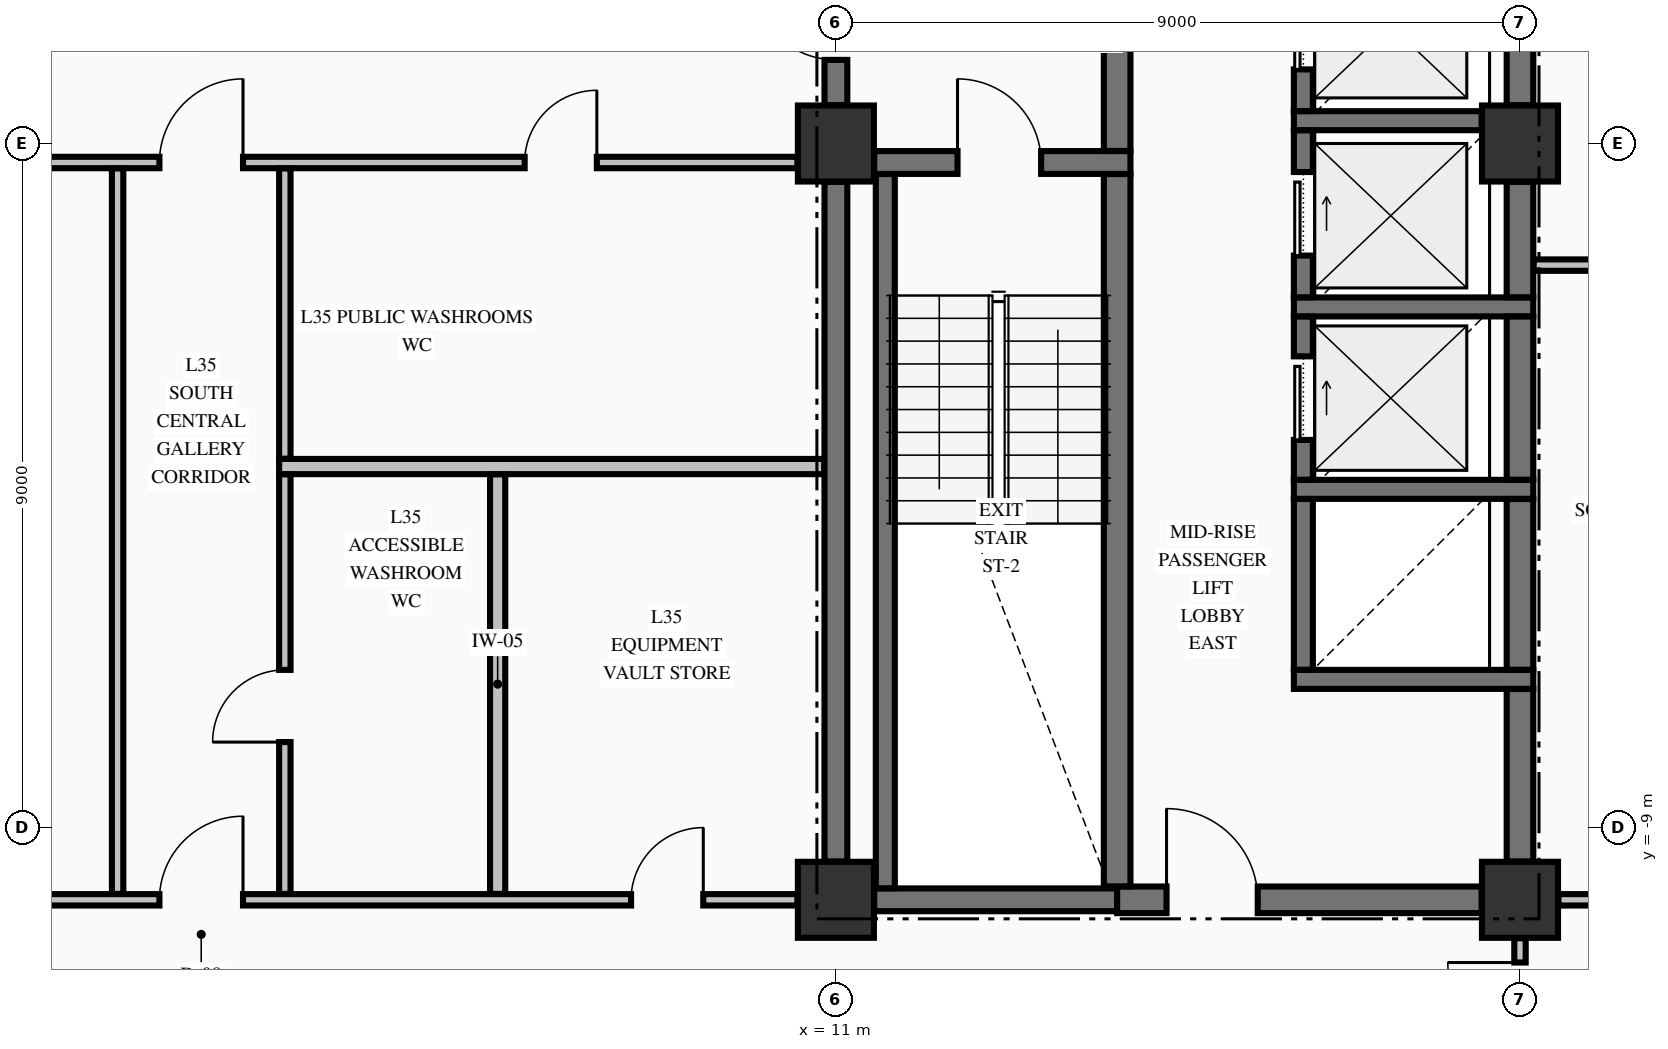
"""IFC4 building model, lengths in metres.
Left out: names, types, materials, properties, quantities, classifications, styles, units other than length and angle.
Written with IfcOpenShell. Run it as: python <this file> out.ifc"""

import sys

from ifc_helpers import new_model, si_unit, direction, frame, frame_2d, origin, origin_2d, place, context, subcontext, project, spatial, rectangle, extrude, element, fill, save


model = new_model("IFC4")
c1 = context("Model", 3, precision=1e-05, world=origin(), true_north=direction((0.0, 1.0)))
c2 = subcontext(c1, "Body", "Model", "MODEL_VIEW")
j1 = project(units=[si_unit("LENGTHUNIT", "METRE"), si_unit("PLANEANGLEUNIT", "RADIAN")], contexts=[c1])
p1 = place(None, origin())
s1 = spatial("IfcSite", under=j1, at=p1, CompositionType="ELEMENT")
p2 = place(p1, origin())
s2 = spatial("IfcBuilding", under=s1, at=p2, CompositionType="ELEMENT")
p3 = place(p2, frame((0.0, 0.0, 139.2)))
s3 = spatial("IfcBuildingStorey", under=s2, at=p3, CompositionType="ELEMENT", Elevation=139.2)
for number, where, z_axis, x_axis in (
    (1, (11.0, -9.95, -0.25), (0.0, 0.0, 1.0), (1.0, 0.0, 0.0)),
    (2, (11.0, 0.0, -0.25), (0.0, 0.0, 1.0), (1.0, 0.0, 0.0)),
    (3, (20.0, -9.95, -0.25), (0.0, 0.0, 1.0), (1.0, 0.0, 0.0)),
    (4, (20.0, 0.0, -0.25), (0.0, 0.0, 1.0), (1.0, 0.0, 0.0)),
):
    element("IfcColumn", number, at=place(p3, frame(where, z_axis=z_axis, x_axis=x_axis)), inside=s3, PredefinedType="COLUMN", context=c2, shape_type="SweptSolid", body=[
        extrude(rectangle(XDim=1.0, YDim=1.0, at=origin_2d()), origin(), (0.0, 0.0, 1.0), 3.495),
    ])
p4 = place(p3, frame((11.504, -9.95, 0.0), z_axis=(0.0, 0.0, 1.0), x_axis=(1.0, 0.0, 0.0)))
e5 = element("IfcWall", 5, at=p4, inside=s3, PredefinedType="SHEAR", context=c2, shape_type="SweptSolid", body=[
    extrude(rectangle(XDim=3.196, YDim=0.3, at=frame_2d((1.598, 0.0))), origin(), (0.0, 0.0, 1.0), 3.245),
])
p5 = place(p3, frame((14.7, -9.95, 0.0), z_axis=(0.0, 0.0, 1.0), x_axis=(1.0, 0.0, 0.0)))
e6 = element("IfcWall", 6, at=p5, inside=s3, PredefinedType="SHEAR", context=c2, shape_type="SweptSolid", body=[
    extrude(rectangle(XDim=4.796, YDim=0.35, at=frame_2d((2.398, 0.0))), origin(), (0.0, 0.0, 1.0), 3.245),
])
p6 = place(p5, frame((0.65, 0.0, 0.0)))
e7 = element("IfcOpeningElement", 7, at=p6, cuts=e6, PredefinedType="OPENING", context=c2, shape_type="SweptSolid", body=[
    extrude(rectangle(XDim=1.2, YDim=2.15, at=frame_2d((0.6, 1.075))), frame((0.0, 0.185, 0.0), z_axis=(0.0, -1.0, 0.0), x_axis=(1.0, 0.0, 0.0)), (0.0, 0.0, 1.0), 0.37),
])
for number, where, z_axis, x_axis in (
    (8, (17.025, -7.05, 0.0), (0.0, 0.0, 1.0), (1.0, 0.0, 0.0)),
    (9, (17.025, -4.55, 0.0), (0.0, 0.0, 1.0), (1.0, 0.0, 0.0)),
    (10, (17.025, -2.15, 0.0), (0.0, 0.0, 1.0), (1.0, 0.0, 0.0)),
):
    element("IfcWall", number, at=place(p3, frame(where, z_axis=z_axis, x_axis=x_axis)), inside=s3, PredefinedType="SOLIDWALL", context=c2, shape_type="SweptSolid", body=[
        extrude(rectangle(XDim=3.15, YDim=0.25, at=frame_2d((1.575, 0.0))), origin(), (0.0, 0.0, 1.0), 3.245),
    ])
p7 = place(p3, frame((11.504, -0.25, 0.0), z_axis=(0.0, 0.0, 1.0), x_axis=(1.0, 0.0, 0.0)))
e11 = element("IfcWall", 11, at=p7, inside=s3, PredefinedType="SHEAR", context=c2, shape_type="SweptSolid", body=[
    extrude(rectangle(XDim=3.371, YDim=0.3, at=frame_2d((1.686, 0.0))), origin(), (0.0, 0.0, 1.0), 3.245),
])
p8 = place(p7, frame((1.096, 0.0, 0.0)))
e12 = element("IfcOpeningElement", 12, at=p8, cuts=e11, PredefinedType="OPENING", context=c2, shape_type="SweptSolid", body=[
    extrude(rectangle(XDim=1.1, YDim=2.15, at=frame_2d((0.55, 1.075))), frame((0.0, 0.16, 0.0), z_axis=(0.0, -1.0, 0.0), x_axis=(1.0, 0.0, 0.0)), (0.0, 0.0, 1.0), 0.32),
])
p9 = place(p3, frame((17.025, 0.3, 0.0), z_axis=(0.0, 0.0, 1.0), x_axis=(1.0, 0.0, 0.0)))
e13 = element("IfcWall", 13, at=p9, inside=s3, PredefinedType="SOLIDWALL", context=c2, shape_type="SweptSolid", body=[
    extrude(rectangle(XDim=2.471, YDim=0.25, at=frame_2d((1.236, 0.0))), origin(), (0.0, 0.0, 1.0), 3.245),
])
p10 = place(p3, frame((-10.494, -9.95, 0.0), z_axis=(0.0, 0.0, 1.0), x_axis=(1.0, 0.0, 0.0)))
e14 = element("IfcWall", 14, at=p10, inside=s3, PredefinedType="PARTITIONING", context=c2, shape_type="SweptSolid", body=[
    extrude(rectangle(XDim=20.988, YDim=0.15, at=frame_2d((10.494, 0.0))), origin(), (0.0, 0.0, 1.0), 3.245),
])
p11 = place(p10, frame((12.594, 0.0, 0.0)))
e15 = element("IfcOpeningElement", 15, at=p11, cuts=e14, PredefinedType="OPENING", context=c2, shape_type="SweptSolid", body=[
    extrude(rectangle(XDim=1.1, YDim=2.15, at=frame_2d((0.55, 1.075))), frame((0.0, 0.085, 0.0), z_axis=(0.0, -1.0, 0.0), x_axis=(1.0, 0.0, 0.0)), (0.0, 0.0, 1.0), 0.17),
])
p12 = place(p10, frame((18.799, 0.0, 0.0)))
e16 = element("IfcOpeningElement", 16, at=p12, cuts=e14, PredefinedType="OPENING", context=c2, shape_type="SweptSolid", body=[
    extrude(rectangle(XDim=0.95, YDim=2.15, at=frame_2d((0.475, 1.075))), frame((0.0, 0.085, 0.0), z_axis=(0.0, -1.0, 0.0), x_axis=(1.0, 0.0, 0.0)), (0.0, 0.0, 1.0), 0.17),
])
p13 = place(p3, frame((20.506, -9.95, 0.0), z_axis=(0.0, 0.0, 1.0), x_axis=(1.0, 0.0, 0.0)))
e17 = element("IfcWall", 17, at=p13, inside=s3, PredefinedType="PARTITIONING", context=c2, shape_type="SweptSolid", body=[
    extrude(rectangle(XDim=2.329, YDim=0.15, at=frame_2d((1.165, 0.0))), origin(), (0.0, 0.0, 1.0), 3.245),
])
p14 = place(p13, frame((0.519, 0.0, 0.0)))
e18 = element("IfcOpeningElement", 18, at=p14, cuts=e17, PredefinedType="OPENING", context=c2, shape_type="SweptSolid", body=[
    extrude(rectangle(XDim=0.95, YDim=2.15, at=frame_2d((0.475, 1.075))), frame((0.0, 0.085, 0.0), z_axis=(0.0, -1.0, 0.0), x_axis=(1.0, 0.0, 0.0)), (0.0, 0.0, 1.0), 0.17),
])
p15 = place(p3, frame((3.675, -4.25, 0.0), z_axis=(0.0, 0.0, 1.0), x_axis=(1.0, 0.0, 0.0)))
e19 = element("IfcWall", 19, at=p15, inside=s3, PredefinedType="PARTITIONING", context=c2, shape_type="SweptSolid", body=[
    extrude(rectangle(XDim=7.172, YDim=0.2, at=frame_2d((3.586, 0.0))), origin(), (0.0, 0.0, 1.0), 3.245),
])
p16 = place(p3, frame((20.178, -1.6, 0.0), z_axis=(0.0, 0.0, 1.0), x_axis=(1.0, 0.0, 0.0)))
e20 = element("IfcWall", 20, at=p16, inside=s3, PredefinedType="PARTITIONING", context=c2, shape_type="SweptSolid", body=[
    extrude(rectangle(XDim=2.657, YDim=0.15, at=frame_2d((1.329, 0.0))), origin(), (0.0, 0.0, 1.0), 3.245),
])
p17 = place(p3, frame((-10.494, -0.25, 0.0), z_axis=(0.0, 0.0, 1.0), x_axis=(1.0, 0.0, 0.0)))
e21 = element("IfcWall", 21, at=p17, inside=s3, PredefinedType="PARTITIONING", context=c2, shape_type="SweptSolid", body=[
    extrude(rectangle(XDim=20.988, YDim=0.15, at=frame_2d((10.494, 0.0))), origin(), (0.0, 0.0, 1.0), 3.245),
])
p18 = place(p17, frame((12.594, 0.0, 0.0)))
e22 = element("IfcOpeningElement", 22, at=p18, cuts=e21, PredefinedType="OPENING", context=c2, shape_type="SweptSolid", body=[
    extrude(rectangle(XDim=1.1, YDim=2.15, at=frame_2d((0.55, 1.075))), frame((0.0, 0.085, 0.0), z_axis=(0.0, -1.0, 0.0), x_axis=(1.0, 0.0, 0.0)), (0.0, 0.0, 1.0), 0.17),
])
p19 = place(p17, frame((5.249, 0.0, 0.0)))
e23 = element("IfcOpeningElement", 23, at=p19, cuts=e21, PredefinedType="OPENING", context=c2, shape_type="SweptSolid", body=[
    extrude(rectangle(XDim=1.05, YDim=2.15, at=frame_2d((0.525, 1.075))), frame((0.0, 0.085, 0.0), z_axis=(0.0, -1.0, 0.0), x_axis=(1.0, 0.0, 0.0)), (0.0, 0.0, 1.0), 0.17),
])
p20 = place(p17, frame((17.399, 0.0, 0.0)))
e24 = element("IfcOpeningElement", 24, at=p20, cuts=e21, PredefinedType="OPENING", context=c2, shape_type="SweptSolid", body=[
    extrude(rectangle(XDim=0.95, YDim=2.15, at=frame_2d((0.475, 1.075))), frame((0.0, 0.085, 0.0), z_axis=(0.0, -1.0, 0.0), x_axis=(1.0, 0.0, 0.0)), (0.0, 0.0, 1.0), 0.17),
])
p21 = place(p3, frame((11.0, -9.446, 0.0), z_axis=(0.0, 0.0, 1.0), x_axis=(0.0, 1.0, 0.0)))
e25 = element("IfcWall", 25, at=p21, inside=s3, PredefinedType="SHEAR", context=c2, shape_type="SweptSolid", body=[
    extrude(rectangle(XDim=8.942, YDim=0.3, at=frame_2d((4.471, 0.0))), origin(), (0.0, 0.0, 1.0), 3.245),
])
p22 = place(p3, frame((11.0, 0.504, 0.0), z_axis=(0.0, 0.0, 1.0), x_axis=(0.0, 1.0, 0.0)))
e26 = element("IfcWall", 26, at=p22, inside=s3, PredefinedType="SHEAR", context=c2, shape_type="SweptSolid", body=[
    extrude(rectangle(XDim=2.244, YDim=0.3, at=frame_2d((1.122, 0.0))), origin(), (0.0, 0.0, 1.0), 3.245),
])
p23 = place(p22, frame((0.596, 0.0, 0.0)))
e27 = element("IfcOpeningElement", 27, at=p23, cuts=e26, PredefinedType="OPENING", context=c2, shape_type="SweptSolid", body=[
    extrude(rectangle(XDim=1.1, YDim=2.15, at=frame_2d((0.55, 1.075))), frame((0.0, 0.16, 0.0), z_axis=(0.0, -1.0, 0.0), x_axis=(1.0, 0.0, 0.0)), (0.0, 0.0, 1.0), 0.32),
])
p24 = place(p3, frame((11.65, -9.798, 0.0), z_axis=(0.0, 0.0, 1.0), x_axis=(0.0, 1.0, 0.0)))
e28 = element("IfcWall", 28, at=p24, inside=s3, PredefinedType="SOLIDWALL", context=c2, shape_type="SweptSolid", body=[
    extrude(rectangle(XDim=9.396, YDim=0.25, at=frame_2d((4.698, 0.0))), origin(), (0.0, 0.0, 1.0), 3.245),
])
p25 = place(p3, frame((14.7, -9.773, 0.0), z_axis=(0.0, 0.0, 1.0), x_axis=(0.0, 1.0, 0.0)))
e29 = element("IfcWall", 29, at=p25, inside=s3, PredefinedType="SHEAR", context=c2, shape_type="SweptSolid", body=[
    extrude(rectangle(XDim=9.371, YDim=0.35, at=frame_2d((4.686, 0.0))), origin(), (0.0, 0.0, 1.0), 3.245),
])
p26 = place(p3, frame((14.7, -0.098, 0.0), z_axis=(0.0, 0.0, 1.0), x_axis=(0.0, 1.0, 0.0)))
e30 = element("IfcWall", 30, at=p26, inside=s3, PredefinedType="SHEAR", context=c2, shape_type="SweptSolid", body=[
    extrude(rectangle(XDim=2.846, YDim=0.35, at=frame_2d((1.423, 0.0))), origin(), (0.0, 0.0, 1.0), 3.245),
])
p27 = place(p3, frame((17.15, -6.923, 0.0), z_axis=(0.0, 0.0, 1.0), x_axis=(0.0, 1.0, 0.0)))
e31 = element("IfcWall", 31, at=p27, inside=s3, PredefinedType="SOLIDWALL", context=c2, shape_type="SweptSolid", body=[
    extrude(rectangle(XDim=2.246, YDim=0.25, at=frame_2d((1.123, 0.0))), origin(), (0.0, 0.0, 1.0), 3.245),
])
p28 = place(p3, frame((17.15, -4.423, 0.0), z_axis=(0.0, 0.0, 1.0), x_axis=(0.0, 1.0, 0.0)))
e32 = element("IfcWall", 32, at=p28, inside=s3, PredefinedType="SOLIDWALL", context=c2, shape_type="SweptSolid", body=[
    extrude(rectangle(XDim=2.146, YDim=0.25, at=frame_2d((1.073, 0.0))), origin(), (0.0, 0.0, 1.0), 3.245),
])
p29 = place(p28, frame((0.523, 0.0, 0.0)))
e33 = element("IfcOpeningElement", 33, at=p29, cuts=e32, PredefinedType="OPENING", context=c2, shape_type="SweptSolid", body=[
    extrude(rectangle(XDim=1.1, YDim=2.2, at=frame_2d((0.55, 1.1))), frame((0.0, 0.135, 0.0), z_axis=(0.0, -1.0, 0.0), x_axis=(1.0, 0.0, 0.0)), (0.0, 0.0, 1.0), 0.27),
])
p30 = place(p3, frame((17.15, -2.023, 0.0), z_axis=(0.0, 0.0, 1.0), x_axis=(0.0, 1.0, 0.0)))
e34 = element("IfcWall", 34, at=p30, inside=s3, PredefinedType="SOLIDWALL", context=c2, shape_type="SweptSolid", body=[
    extrude(rectangle(XDim=2.196, YDim=0.25, at=frame_2d((1.098, 0.0))), origin(), (0.0, 0.0, 1.0), 3.245),
])
p31 = place(p30, frame((0.548, 0.0, 0.0)))
e35 = element("IfcOpeningElement", 35, at=p31, cuts=e34, PredefinedType="OPENING", context=c2, shape_type="SweptSolid", body=[
    extrude(rectangle(XDim=1.1, YDim=2.2, at=frame_2d((0.55, 1.1))), frame((0.0, 0.135, 0.0), z_axis=(0.0, -1.0, 0.0), x_axis=(1.0, 0.0, 0.0)), (0.0, 0.0, 1.0), 0.27),
])
p32 = place(p3, frame((17.15, 0.427, 0.0), z_axis=(0.0, 0.0, 1.0), x_axis=(0.0, 1.0, 0.0)))
e36 = element("IfcWall", 36, at=p32, inside=s3, PredefinedType="SOLIDWALL", context=c2, shape_type="SweptSolid", body=[
    extrude(rectangle(XDim=2.196, YDim=0.25, at=frame_2d((1.098, 0.0))), origin(), (0.0, 0.0, 1.0), 3.245),
])
p33 = place(p32, frame((0.548, 0.0, 0.0)))
e37 = element("IfcOpeningElement", 37, at=p33, cuts=e36, PredefinedType="OPENING", context=c2, shape_type="SweptSolid", body=[
    extrude(rectangle(XDim=1.1, YDim=2.2, at=frame_2d((0.55, 1.1))), frame((0.0, 0.135, 0.0), z_axis=(0.0, -1.0, 0.0), x_axis=(1.0, 0.0, 0.0)), (0.0, 0.0, 1.0), 0.27),
])
p34 = place(p3, frame((20.0, -9.446, 0.0), z_axis=(0.0, 0.0, 1.0), x_axis=(0.0, 1.0, 0.0)))
e38 = element("IfcWall", 38, at=p34, inside=s3, PredefinedType="SHEAR", context=c2, shape_type="SweptSolid", body=[
    extrude(rectangle(XDim=2.269, YDim=0.35, at=frame_2d((1.135, 0.0))), origin(), (0.0, 0.0, 1.0), 3.245),
])
p35 = place(p3, frame((20.0, -6.923, 0.0), z_axis=(0.0, 0.0, 1.0), x_axis=(0.0, 1.0, 0.0)))
e39 = element("IfcWall", 39, at=p35, inside=s3, PredefinedType="SHEAR", context=c2, shape_type="SweptSolid", body=[
    extrude(rectangle(XDim=2.246, YDim=0.35, at=frame_2d((1.123, 0.0))), origin(), (0.0, 0.0, 1.0), 3.245),
])
p36 = place(p3, frame((20.0, -4.423, 0.0), z_axis=(0.0, 0.0, 1.0), x_axis=(0.0, 1.0, 0.0)))
e40 = element("IfcWall", 40, at=p36, inside=s3, PredefinedType="SHEAR", context=c2, shape_type="SweptSolid", body=[
    extrude(rectangle(XDim=2.146, YDim=0.35, at=frame_2d((1.073, 0.0))), origin(), (0.0, 0.0, 1.0), 3.245),
])
p37 = place(p3, frame((20.0, -2.023, 0.0), z_axis=(0.0, 0.0, 1.0), x_axis=(0.0, 1.0, 0.0)))
e41 = element("IfcWall", 41, at=p37, inside=s3, PredefinedType="SHEAR", context=c2, shape_type="SweptSolid", body=[
    extrude(rectangle(XDim=1.519, YDim=0.35, at=frame_2d((0.76, 0.0))), origin(), (0.0, 0.0, 1.0), 3.245),
])
p38 = place(p3, frame((20.0, 0.504, 0.0), z_axis=(0.0, 0.0, 1.0), x_axis=(0.0, 1.0, 0.0)))
e42 = element("IfcWall", 42, at=p38, inside=s3, PredefinedType="SHEAR", context=c2, shape_type="SweptSolid", body=[
    extrude(rectangle(XDim=2.119, YDim=0.35, at=frame_2d((1.06, 0.0))), origin(), (0.0, 0.0, 1.0), 3.245),
])
p39 = place(p3, frame((1.55, -9.872, 0.0), z_axis=(0.0, 0.0, 1.0), x_axis=(0.0, 1.0, 0.0)))
e43 = element("IfcWall", 43, at=p39, inside=s3, PredefinedType="PARTITIONING", context=c2, shape_type="SweptSolid", body=[
    extrude(rectangle(XDim=9.544, YDim=0.15, at=frame_2d((4.772, 0.0))), origin(), (0.0, 0.0, 1.0), 3.245),
])
p40 = place(p3, frame((3.75, -9.872, 0.0), z_axis=(0.0, 0.0, 1.0), x_axis=(0.0, 1.0, 0.0)))
e44 = element("IfcWall", 44, at=p40, inside=s3, PredefinedType="PARTITIONING", context=c2, shape_type="SweptSolid", body=[
    extrude(rectangle(XDim=5.519, YDim=0.15, at=frame_2d((2.76, 0.0))), origin(), (0.0, 0.0, 1.0), 3.245),
])
p41 = place(p40, frame((1.997, 0.0, 0.0)))
e45 = element("IfcOpeningElement", 45, at=p41, cuts=e44, PredefinedType="OPENING", context=c2, shape_type="SweptSolid", body=[
    extrude(rectangle(XDim=0.95, YDim=2.15, at=frame_2d((0.475, 1.075))), frame((0.0, 0.085, 0.0), z_axis=(0.0, -1.0, 0.0), x_axis=(1.0, 0.0, 0.0)), (0.0, 0.0, 1.0), 0.17),
])
p42 = place(p3, frame((3.75, -4.147, 0.0), z_axis=(0.0, 0.0, 1.0), x_axis=(0.0, 1.0, 0.0)))
e46 = element("IfcWall", 46, at=p42, inside=s3, PredefinedType="PARTITIONING", context=c2, shape_type="SweptSolid", body=[
    extrude(rectangle(XDim=3.819, YDim=0.15, at=frame_2d((1.91, 0.0))), origin(), (0.0, 0.0, 1.0), 3.245),
])
p43 = place(p3, frame((6.55, -9.872, 0.0), z_axis=(0.0, 0.0, 1.0), x_axis=(0.0, 1.0, 0.0)))
e47 = element("IfcWall", 47, at=p43, inside=s3, PredefinedType="PARTITIONING", context=c2, shape_type="SweptSolid", body=[
    extrude(rectangle(XDim=5.519, YDim=0.2, at=frame_2d((2.76, 0.0))), origin(), (0.0, 0.0, 1.0), 3.245),
])
p44 = place(p3, frame((20.0, -12.472, 0.0), z_axis=(0.0, 0.0, 1.0), x_axis=(0.0, 1.0, 0.0)))
e48 = element("IfcWall", 48, at=p44, inside=s3, PredefinedType="PARTITIONING", context=c2, shape_type="SweptSolid", body=[
    extrude(rectangle(XDim=2.016, YDim=0.15, at=frame_2d((1.008, 0.0))), origin(), (0.0, 0.0, 1.0), 2.735),
])
p45 = place(p44, frame((0.747, 0.0, 0.0)))
e49 = element("IfcOpeningElement", 49, at=p45, cuts=e48, PredefinedType="OPENING", context=c2, shape_type="SweptSolid", body=[
    extrude(rectangle(XDim=0.95, YDim=2.15, at=frame_2d((0.475, 1.075))), frame((0.0, 0.085, 0.0), z_axis=(0.0, -1.0, 0.0), x_axis=(1.0, 0.0, 0.0)), (0.0, 0.0, 1.0), 0.17),
])
p46 = place(p8, origin())
e50 = element("IfcDoor", 50, at=p46, inside=s3, OperationType="SINGLE_SWING_LEFT", PredefinedType="DOOR", context=c2, shape_type="SweptSolid", body=[
    extrude(rectangle(XDim=1.1, YDim=2.15, at=frame_2d((0.55, 1.075))), frame((0.0, 0.025, 0.0), z_axis=(0.0, -1.0, 0.0), x_axis=(1.0, 0.0, 0.0)), (0.0, 0.0, 1.0), 0.05),
])
fill(e12, e50)
p47 = place(p23, origin())
e51 = element("IfcDoor", 51, at=p47, inside=s3, OperationType="SINGLE_SWING_RIGHT", PredefinedType="DOOR", context=c2, shape_type="SweptSolid", body=[
    extrude(rectangle(XDim=1.1, YDim=2.15, at=frame_2d((0.55, 1.075))), frame((0.0, 0.025, 0.0), z_axis=(0.0, -1.0, 0.0), x_axis=(1.0, 0.0, 0.0)), (0.0, 0.0, 1.0), 0.05),
])
fill(e27, e51)
p48 = place(p29, origin())
e52 = element("IfcDoor", 52, at=p48, inside=s3, OperationType="SLIDING_TO_RIGHT", PredefinedType="DOOR", context=c2, shape_type="SweptSolid", body=[
    extrude(rectangle(XDim=1.1, YDim=2.2, at=frame_2d((0.55, 1.1))), frame((0.0, 0.025, 0.0), z_axis=(0.0, -1.0, 0.0), x_axis=(1.0, 0.0, 0.0)), (0.0, 0.0, 1.0), 0.05),
])
fill(e33, e52)
p49 = place(p31, origin())
e53 = element("IfcDoor", 53, at=p49, inside=s3, OperationType="SLIDING_TO_RIGHT", PredefinedType="DOOR", context=c2, shape_type="SweptSolid", body=[
    extrude(rectangle(XDim=1.1, YDim=2.2, at=frame_2d((0.55, 1.1))), frame((0.0, 0.025, 0.0), z_axis=(0.0, -1.0, 0.0), x_axis=(1.0, 0.0, 0.0)), (0.0, 0.0, 1.0), 0.05),
])
fill(e35, e53)
p50 = place(p33, origin())
e54 = element("IfcDoor", 54, at=p50, inside=s3, OperationType="SLIDING_TO_RIGHT", PredefinedType="DOOR", context=c2, shape_type="SweptSolid", body=[
    extrude(rectangle(XDim=1.1, YDim=2.2, at=frame_2d((0.55, 1.1))), frame((0.0, 0.025, 0.0), z_axis=(0.0, -1.0, 0.0), x_axis=(1.0, 0.0, 0.0)), (0.0, 0.0, 1.0), 0.05),
])
fill(e37, e54)
p51 = place(p6, origin())
e55 = element("IfcDoor", 55, at=p51, inside=s3, OperationType="SINGLE_SWING_LEFT", PredefinedType="DOOR", context=c2, shape_type="SweptSolid", body=[
    extrude(rectangle(XDim=1.2, YDim=2.15, at=frame_2d((0.6, 1.075))), frame((0.0, 0.025, 0.0), z_axis=(0.0, -1.0, 0.0), x_axis=(1.0, 0.0, 0.0)), (0.0, 0.0, 1.0), 0.05),
])
fill(e7, e55)
p52 = place(p11, origin())
e56 = element("IfcDoor", 56, at=p52, inside=s3, OperationType="SINGLE_SWING_RIGHT", PredefinedType="DOOR", context=c2, shape_type="SweptSolid", body=[
    extrude(rectangle(XDim=1.1, YDim=2.15, at=frame_2d((0.55, 1.075))), frame((0.0, 0.025, 0.0), z_axis=(0.0, -1.0, 0.0), x_axis=(1.0, 0.0, 0.0)), (0.0, 0.0, 1.0), 0.05),
])
fill(e15, e56)
p53 = place(p18, origin())
e57 = element("IfcDoor", 57, at=p53, inside=s3, OperationType="SINGLE_SWING_RIGHT", PredefinedType="DOOR", context=c2, shape_type="SweptSolid", body=[
    extrude(rectangle(XDim=1.1, YDim=2.15, at=frame_2d((0.55, 1.075))), frame((0.0, 0.025, 0.0), z_axis=(0.0, -1.0, 0.0), x_axis=(1.0, 0.0, 0.0)), (0.0, 0.0, 1.0), 0.05),
])
fill(e22, e57)
p54 = place(p20, origin())
e58 = element("IfcDoor", 58, at=p54, inside=s3, OperationType="SINGLE_SWING_RIGHT", PredefinedType="DOOR", context=c2, shape_type="SweptSolid", body=[
    extrude(rectangle(XDim=0.95, YDim=2.15, at=frame_2d((0.475, 1.075))), frame((0.0, 0.025, 0.0), z_axis=(0.0, -1.0, 0.0), x_axis=(1.0, 0.0, 0.0)), (0.0, 0.0, 1.0), 0.05),
])
fill(e24, e58)
p55 = place(p41, origin())
e59 = element("IfcDoor", 59, at=p55, inside=s3, OperationType="SINGLE_SWING_LEFT", PredefinedType="DOOR", context=c2, shape_type="SweptSolid", body=[
    extrude(rectangle(XDim=0.95, YDim=2.15, at=frame_2d((0.475, 1.075))), frame((0.0, 0.025, 0.0), z_axis=(0.0, -1.0, 0.0), x_axis=(1.0, 0.0, 0.0)), (0.0, 0.0, 1.0), 0.05),
])
fill(e45, e59)
p56 = place(p12, origin())
e60 = element("IfcDoor", 60, at=p56, inside=s3, OperationType="SINGLE_SWING_RIGHT", PredefinedType="DOOR", context=c2, shape_type="SweptSolid", body=[
    extrude(rectangle(XDim=0.95, YDim=2.15, at=frame_2d((0.475, 1.075))), frame((0.0, 0.025, 0.0), z_axis=(0.0, -1.0, 0.0), x_axis=(1.0, 0.0, 0.0)), (0.0, 0.0, 1.0), 0.05),
])
fill(e16, e60)
p57 = place(p45, origin())
e61 = element("IfcDoor", 61, at=p57, inside=s3, OperationType="SINGLE_SWING_RIGHT", PredefinedType="DOOR", context=c2, shape_type="SweptSolid", body=[
    extrude(rectangle(XDim=0.95, YDim=2.15, at=frame_2d((0.475, 1.075))), frame((0.0, 0.025, 0.0), z_axis=(0.0, -1.0, 0.0), x_axis=(1.0, 0.0, 0.0)), (0.0, 0.0, 1.0), 0.05),
])
fill(e49, e61)
save(model, sys.argv[1])
